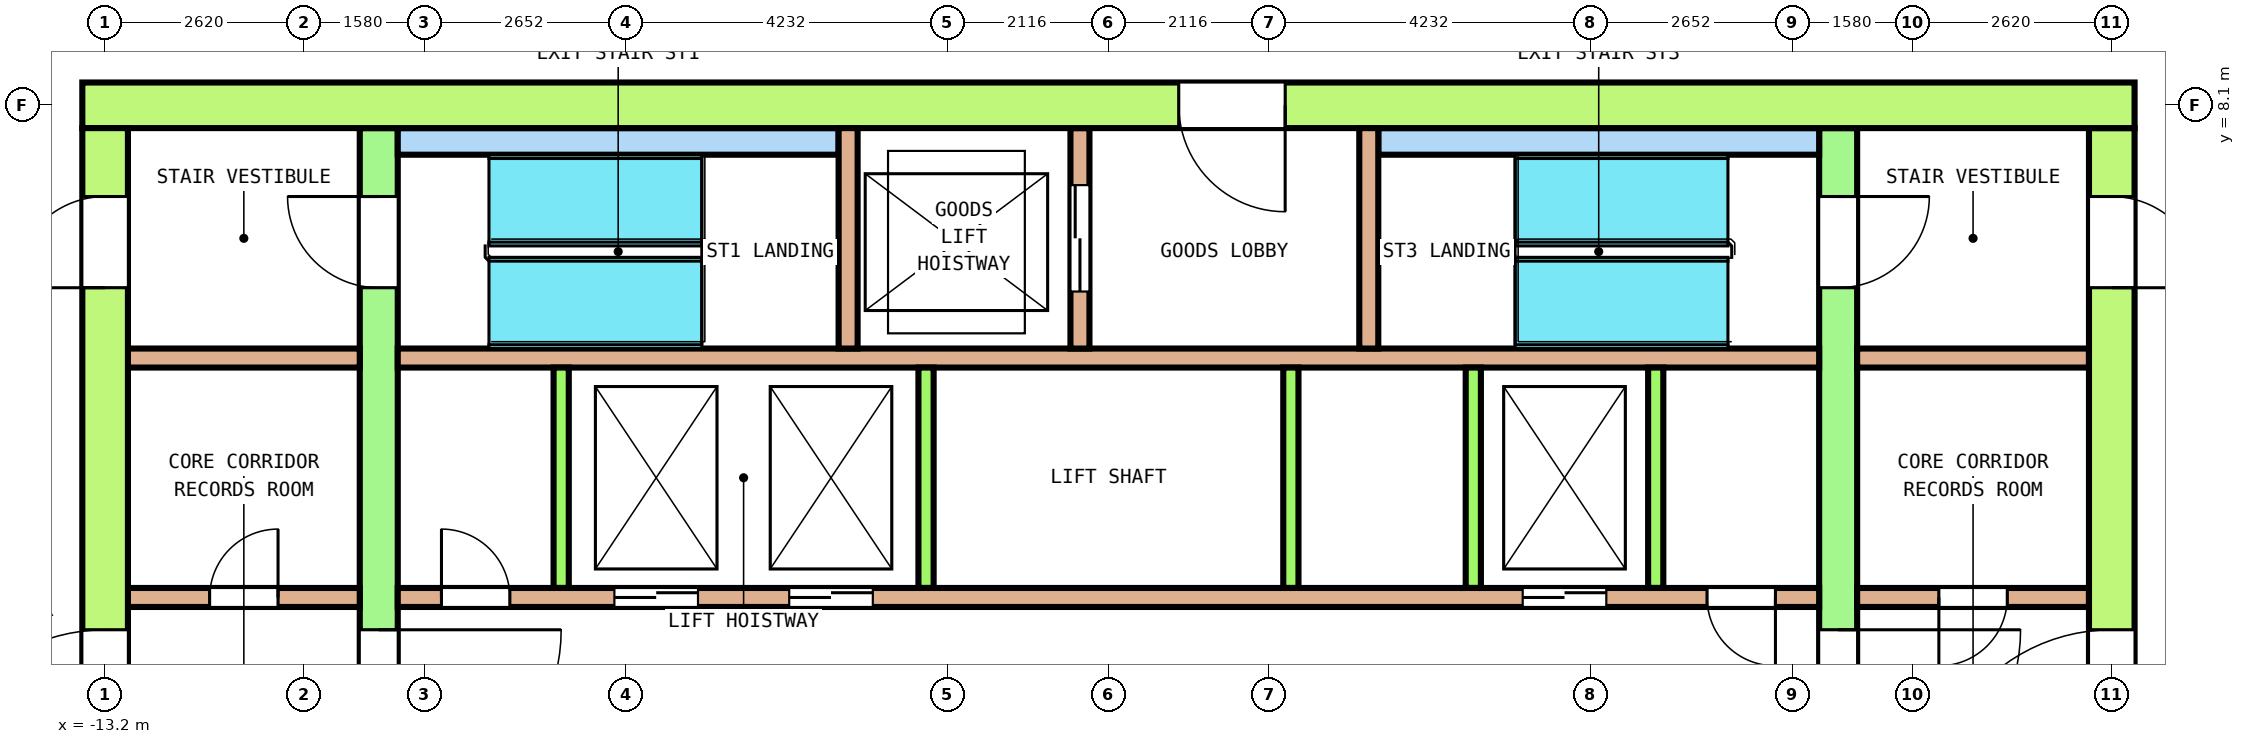
"""IFC4 building model, lengths in metres.
Left out: names, types, materials, properties, quantities, classifications, styles, units other than length and angle.
Written with IfcOpenShell. Run it as: python <this file> out.ifc"""

import sys

from ifc_helpers import new_model, si_unit, direction, frame, frame_2d, origin, place, context, subcontext, project, spatial, rectangle, extrude, element, fill, save


model = new_model("IFC4")
c1 = context("Model", 3, precision=1e-05, world=origin(), true_north=direction((0.0, 1.0)))
c2 = subcontext(c1, "Body", "Model", "MODEL_VIEW")
j1 = project(units=[si_unit("LENGTHUNIT", "METRE"), si_unit("PLANEANGLEUNIT", "RADIAN")], contexts=[c1])
p1 = place(None, origin())
s1 = spatial("IfcSite", under=j1, at=p1, CompositionType="ELEMENT")
p2 = place(p1, origin())
s2 = spatial("IfcBuilding", under=s1, at=p2, CompositionType="ELEMENT")
p3 = place(p2, frame((0.0, 0.0, 211.4)))
s3 = spatial("IfcBuildingStorey", under=s2, at=p3, CompositionType="ELEMENT", Elevation=211.4)
p4 = place(p3, frame((-13.5, 8.1, 0.0), z_axis=(0.0, 0.0, 1.0), x_axis=(1.0, 0.0, 0.0)))
e1 = element("IfcWall", 1, at=p4, inside=s3, PredefinedType="SHEAR", context=c2, shape_type="SweptSolid", body=[
    extrude(rectangle(XDim=27.0, YDim=0.6, at=frame_2d((13.5, 0.0))), origin(), (0.0, 0.0, 1.0), 3.7),
])
p5 = place(p4, frame((14.425, 0.0, 0.0)))
e2 = element("IfcOpeningElement", 2, at=p5, cuts=e1, PredefinedType="OPENING", context=c2, shape_type="SweptSolid", body=[
    extrude(rectangle(XDim=1.4, YDim=2.1, at=frame_2d((0.7, 1.05))), frame((0.0, 0.31, 0.0), z_axis=(0.0, -1.0, 0.0), x_axis=(1.0, 0.0, 0.0)), (0.0, 0.0, 1.0), 0.62),
])
p6 = place(p3, frame((-13.2, -7.8, 0.0), z_axis=(0.0, 0.0, 1.0), x_axis=(0.0, 1.0, 0.0)))
e3 = element("IfcWall", 3, at=p6, inside=s3, PredefinedType="SHEAR", context=c2, shape_type="SweptSolid", body=[
    extrude(rectangle(XDim=15.6, YDim=0.6, at=frame_2d((7.8, 0.0))), origin(), (0.0, 0.0, 1.0), 3.7),
])
p7 = place(p6, frame((6.6, 0.0, 0.0)))
e4 = element("IfcOpeningElement", 4, at=p7, cuts=e3, PredefinedType="OPENING", context=c2, shape_type="SweptSolid", body=[
    extrude(rectangle(XDim=2.4, YDim=2.1, at=frame_2d((1.2, 1.05))), frame((0.0, 0.31, 0.0), z_axis=(0.0, -1.0, 0.0), x_axis=(1.0, 0.0, 0.0)), (0.0, 0.0, 1.0), 0.62),
])
p8 = place(p6, frame((13.5, 0.0, 0.0)))
e5 = element("IfcOpeningElement", 5, at=p8, cuts=e3, PredefinedType="OPENING", context=c2, shape_type="SweptSolid", body=[
    extrude(rectangle(XDim=1.2, YDim=2.1, at=frame_2d((0.6, 1.05))), frame((0.0, 0.31, 0.0), z_axis=(0.0, -1.0, 0.0), x_axis=(1.0, 0.0, 0.0)), (0.0, 0.0, 1.0), 0.62),
])
p9 = place(p6, frame((0.9, 0.0, 0.0)))
e6 = element("IfcOpeningElement", 6, at=p9, cuts=e3, PredefinedType="OPENING", context=c2, shape_type="SweptSolid", body=[
    extrude(rectangle(XDim=1.2, YDim=2.1, at=frame_2d((0.6, 1.05))), frame((0.0, 0.31, 0.0), z_axis=(0.0, -1.0, 0.0), x_axis=(1.0, 0.0, 0.0)), (0.0, 0.0, 1.0), 0.62),
])
p10 = place(p3, frame((13.2, -7.8, 0.0), z_axis=(0.0, 0.0, 1.0), x_axis=(0.0, 1.0, 0.0)))
e7 = element("IfcWall", 7, at=p10, inside=s3, PredefinedType="SHEAR", context=c2, shape_type="SweptSolid", body=[
    extrude(rectangle(XDim=15.6, YDim=0.6, at=frame_2d((7.8, 0.0))), origin(), (0.0, 0.0, 1.0), 3.7),
])
p11 = place(p10, frame((6.6, 0.0, 0.0)))
e8 = element("IfcOpeningElement", 8, at=p11, cuts=e7, PredefinedType="OPENING", context=c2, shape_type="SweptSolid", body=[
    extrude(rectangle(XDim=2.4, YDim=2.1, at=frame_2d((1.2, 1.05))), frame((0.0, 0.31, 0.0), z_axis=(0.0, -1.0, 0.0), x_axis=(1.0, 0.0, 0.0)), (0.0, 0.0, 1.0), 0.62),
])
p12 = place(p10, frame((13.5, 0.0, 0.0)))
e9 = element("IfcOpeningElement", 9, at=p12, cuts=e7, PredefinedType="OPENING", context=c2, shape_type="SweptSolid", body=[
    extrude(rectangle(XDim=1.2, YDim=2.1, at=frame_2d((0.6, 1.05))), frame((0.0, 0.31, 0.0), z_axis=(0.0, -1.0, 0.0), x_axis=(1.0, 0.0, 0.0)), (0.0, 0.0, 1.0), 0.62),
])
p13 = place(p10, frame((1.0, 0.0, 0.0)))
e10 = element("IfcOpeningElement", 10, at=p13, cuts=e7, PredefinedType="OPENING", context=c2, shape_type="SweptSolid", body=[
    extrude(rectangle(XDim=1.0, YDim=2.1, at=frame_2d((0.5, 1.05))), frame((0.0, 0.31, 0.0), z_axis=(0.0, -1.0, 0.0), x_axis=(1.0, 0.0, 0.0)), (0.0, 0.0, 1.0), 0.62),
])
p14 = place(p3, frame((-9.6, -7.8, 0.0), z_axis=(0.0, 0.0, 1.0), x_axis=(0.0, 1.0, 0.0)))
e11 = element("IfcWall", 11, at=p14, inside=s3, PredefinedType="SHEAR", context=c2, shape_type="SweptSolid", body=[
    extrude(rectangle(XDim=15.6, YDim=0.5, at=frame_2d((7.8, 0.0))), origin(), (0.0, 0.0, 1.0), 3.7),
])
p15 = place(p14, frame((6.6, 0.0, 0.0)))
e12 = element("IfcOpeningElement", 12, at=p15, cuts=e11, PredefinedType="OPENING", context=c2, shape_type="SweptSolid", body=[
    extrude(rectangle(XDim=2.4, YDim=2.1, at=frame_2d((1.2, 1.05))), frame((0.0, 0.26, 0.0), z_axis=(0.0, -1.0, 0.0), x_axis=(1.0, 0.0, 0.0)), (0.0, 0.0, 1.0), 0.52),
])
p16 = place(p14, frame((13.5, 0.0, 0.0)))
e13 = element("IfcOpeningElement", 13, at=p16, cuts=e11, PredefinedType="OPENING", context=c2, shape_type="SweptSolid", body=[
    extrude(rectangle(XDim=1.2, YDim=2.1, at=frame_2d((0.6, 1.05))), frame((0.0, 0.26, 0.0), z_axis=(0.0, -1.0, 0.0), x_axis=(1.0, 0.0, 0.0)), (0.0, 0.0, 1.0), 0.52),
])
p17 = place(p14, frame((0.9, 0.0, 0.0)))
e14 = element("IfcOpeningElement", 14, at=p17, cuts=e11, PredefinedType="OPENING", context=c2, shape_type="SweptSolid", body=[
    extrude(rectangle(XDim=1.2, YDim=2.1, at=frame_2d((0.6, 1.05))), frame((0.0, 0.26, 0.0), z_axis=(0.0, -1.0, 0.0), x_axis=(1.0, 0.0, 0.0)), (0.0, 0.0, 1.0), 0.52),
])
p18 = place(p3, frame((9.6, -7.8, 0.0), z_axis=(0.0, 0.0, 1.0), x_axis=(0.0, 1.0, 0.0)))
e15 = element("IfcWall", 15, at=p18, inside=s3, PredefinedType="SHEAR", context=c2, shape_type="SweptSolid", body=[
    extrude(rectangle(XDim=15.6, YDim=0.5, at=frame_2d((7.8, 0.0))), origin(), (0.0, 0.0, 1.0), 3.7),
])
p19 = place(p18, frame((6.6, 0.0, 0.0)))
e16 = element("IfcOpeningElement", 16, at=p19, cuts=e15, PredefinedType="OPENING", context=c2, shape_type="SweptSolid", body=[
    extrude(rectangle(XDim=2.4, YDim=2.1, at=frame_2d((1.2, 1.05))), frame((0.0, 0.26, 0.0), z_axis=(0.0, -1.0, 0.0), x_axis=(1.0, 0.0, 0.0)), (0.0, 0.0, 1.0), 0.52),
])
p20 = place(p18, frame((13.5, 0.0, 0.0)))
e17 = element("IfcOpeningElement", 17, at=p20, cuts=e15, PredefinedType="OPENING", context=c2, shape_type="SweptSolid", body=[
    extrude(rectangle(XDim=1.2, YDim=2.1, at=frame_2d((0.6, 1.05))), frame((0.0, 0.26, 0.0), z_axis=(0.0, -1.0, 0.0), x_axis=(1.0, 0.0, 0.0)), (0.0, 0.0, 1.0), 0.52),
])
p21 = place(p18, frame((1.0, 0.0, 0.0)))
e18 = element("IfcOpeningElement", 18, at=p21, cuts=e15, PredefinedType="OPENING", context=c2, shape_type="SweptSolid", body=[
    extrude(rectangle(XDim=1.0, YDim=2.1, at=frame_2d((0.5, 1.05))), frame((0.0, 0.26, 0.0), z_axis=(0.0, -1.0, 0.0), x_axis=(1.0, 0.0, 0.0)), (0.0, 0.0, 1.0), 0.52),
])
p22 = place(p3, frame((-12.9, 1.625, 0.0), z_axis=(0.0, 0.0, 1.0), x_axis=(1.0, 0.0, 0.0)))
e19 = element("IfcWall", 19, at=p22, inside=s3, PredefinedType="SOLIDWALL", context=c2, shape_type="SweptSolid", body=[
    extrude(rectangle(XDim=3.05, YDim=0.25, at=frame_2d((1.525, 0.0))), origin(), (0.0, 0.0, 1.0), 3.7),
])
p23 = place(p22, frame((1.075, 0.0, 0.0)))
e20 = element("IfcOpeningElement", 20, at=p23, cuts=e19, PredefinedType="OPENING", context=c2, shape_type="SweptSolid", body=[
    extrude(rectangle(XDim=0.9, YDim=2.1, at=frame_2d((0.45, 1.05))), frame((0.0, 0.135, 0.0), z_axis=(0.0, -1.0, 0.0), x_axis=(1.0, 0.0, 0.0)), (0.0, 0.0, 1.0), 0.27),
])
p24 = place(p3, frame((-9.35, 1.625, 0.0), z_axis=(0.0, 0.0, 1.0), x_axis=(1.0, 0.0, 0.0)))
e21 = element("IfcWall", 21, at=p24, inside=s3, PredefinedType="SOLIDWALL", context=c2, shape_type="SweptSolid", body=[
    extrude(rectangle(XDim=18.7, YDim=0.25, at=frame_2d((9.35, 0.0))), origin(), (0.0, 0.0, 1.0), 3.7),
])
p25 = place(p24, frame((2.85, 0.0, 0.0)))
e22 = element("IfcOpeningElement", 22, at=p25, cuts=e21, PredefinedType="OPENING", context=c2, shape_type="SweptSolid", body=[
    extrude(rectangle(XDim=1.1, YDim=2.1, at=frame_2d((0.55, 1.05))), frame((0.0, 0.135, 0.0), z_axis=(0.0, -1.0, 0.0), x_axis=(1.0, 0.0, 0.0)), (0.0, 0.0, 1.0), 0.27),
])
p26 = place(p24, frame((5.15, 0.0, 0.0)))
e23 = element("IfcOpeningElement", 23, at=p26, cuts=e21, PredefinedType="OPENING", context=c2, shape_type="SweptSolid", body=[
    extrude(rectangle(XDim=1.1, YDim=2.1, at=frame_2d((0.55, 1.05))), frame((0.0, 0.135, 0.0), z_axis=(0.0, -1.0, 0.0), x_axis=(1.0, 0.0, 0.0)), (0.0, 0.0, 1.0), 0.27),
])
p27 = place(p24, frame((14.8, 0.0, 0.0)))
e24 = element("IfcOpeningElement", 24, at=p27, cuts=e21, PredefinedType="OPENING", context=c2, shape_type="SweptSolid", body=[
    extrude(rectangle(XDim=1.1, YDim=2.1, at=frame_2d((0.55, 1.05))), frame((0.0, 0.135, 0.0), z_axis=(0.0, -1.0, 0.0), x_axis=(1.0, 0.0, 0.0)), (0.0, 0.0, 1.0), 0.27),
])
p28 = place(p24, frame((0.575, 0.0, 0.0)))
e25 = element("IfcOpeningElement", 25, at=p28, cuts=e21, PredefinedType="OPENING", context=c2, shape_type="SweptSolid", body=[
    extrude(rectangle(XDim=0.9, YDim=2.1, at=frame_2d((0.45, 1.05))), frame((0.0, 0.135, 0.0), z_axis=(0.0, -1.0, 0.0), x_axis=(1.0, 0.0, 0.0)), (0.0, 0.0, 1.0), 0.27),
])
p29 = place(p24, frame((17.225, 0.0, 0.0)))
e26 = element("IfcOpeningElement", 26, at=p29, cuts=e21, PredefinedType="OPENING", context=c2, shape_type="SweptSolid", body=[
    extrude(rectangle(XDim=0.9, YDim=2.1, at=frame_2d((0.45, 1.05))), frame((0.0, 0.135, 0.0), z_axis=(0.0, -1.0, 0.0), x_axis=(1.0, 0.0, 0.0)), (0.0, 0.0, 1.0), 0.27),
])
p30 = place(p3, frame((9.85, 1.625, 0.0), z_axis=(0.0, 0.0, 1.0), x_axis=(1.0, 0.0, 0.0)))
e27 = element("IfcWall", 27, at=p30, inside=s3, PredefinedType="SOLIDWALL", context=c2, shape_type="SweptSolid", body=[
    extrude(rectangle(XDim=3.05, YDim=0.25, at=frame_2d((1.525, 0.0))), origin(), (0.0, 0.0, 1.0), 3.7),
])
p31 = place(p30, frame((1.075, 0.0, 0.0)))
e28 = element("IfcOpeningElement", 28, at=p31, cuts=e27, PredefinedType="OPENING", context=c2, shape_type="SweptSolid", body=[
    extrude(rectangle(XDim=0.9, YDim=2.1, at=frame_2d((0.45, 1.05))), frame((0.0, 0.135, 0.0), z_axis=(0.0, -1.0, 0.0), x_axis=(1.0, 0.0, 0.0)), (0.0, 0.0, 1.0), 0.27),
])
p32 = place(p3, frame((-12.9, 4.775, 0.0), z_axis=(0.0, 0.0, 1.0), x_axis=(1.0, 0.0, 0.0)))
e29 = element("IfcWall", 29, at=p32, inside=s3, PredefinedType="SOLIDWALL", context=c2, shape_type="SweptSolid", body=[
    extrude(rectangle(XDim=3.05, YDim=0.25, at=frame_2d((1.525, 0.0))), origin(), (0.0, 0.0, 1.0), 3.7),
])
p33 = place(p3, frame((-9.35, 4.775, 0.0), z_axis=(0.0, 0.0, 1.0), x_axis=(1.0, 0.0, 0.0)))
e30 = element("IfcWall", 30, at=p33, inside=s3, PredefinedType="SOLIDWALL", context=c2, shape_type="SweptSolid", body=[
    extrude(rectangle(XDim=18.7, YDim=0.25, at=frame_2d((9.35, 0.0))), origin(), (0.0, 0.0, 1.0), 3.7),
])
p34 = place(p3, frame((9.85, 4.775, 0.0), z_axis=(0.0, 0.0, 1.0), x_axis=(1.0, 0.0, 0.0)))
e31 = element("IfcWall", 31, at=p34, inside=s3, PredefinedType="SOLIDWALL", context=c2, shape_type="SweptSolid", body=[
    extrude(rectangle(XDim=3.05, YDim=0.25, at=frame_2d((1.525, 0.0))), origin(), (0.0, 0.0, 1.0), 3.7),
])
for number, where, z_axis, x_axis in (
    (32, (-7.2, 1.75, 0.0), (0.0, 0.0, 1.0), (0.0, 1.0, 0.0)),
    (33, (-2.4, 1.75, 0.0), (0.0, 0.0, 1.0), (0.0, 1.0, 0.0)),
    (34, (2.4, 1.75, 0.0), (0.0, 0.0, 1.0), (0.0, 1.0, 0.0)),
    (35, (4.8, 1.75, 0.0), (0.0, 0.0, 1.0), (0.0, 1.0, 0.0)),
    (36, (7.2, 1.75, 0.0), (0.0, 0.0, 1.0), (0.0, 1.0, 0.0)),
):
    element("IfcWall", number, at=place(p3, frame(where, z_axis=z_axis, x_axis=x_axis)), inside=s3, PredefinedType="SOLIDWALL", context=c2, shape_type="SweptSolid", body=[
        extrude(rectangle(XDim=2.9, YDim=0.2, at=frame_2d((1.45, 0.0))), origin(), (0.0, 0.0, 1.0), 3.7),
    ])
for number, where, z_axis, x_axis in (
    (37, (-9.35, 7.625, 0.0), (0.0, 0.0, 1.0), (1.0, 0.0, 0.0)),
    (38, (3.55, 7.625, 0.0), (0.0, 0.0, 1.0), (1.0, 0.0, 0.0)),
):
    element("IfcWall", number, at=place(p3, frame(where, z_axis=z_axis, x_axis=x_axis)), inside=s3, PredefinedType="SOLIDWALL", context=c2, shape_type="SweptSolid", body=[
        extrude(rectangle(XDim=5.8, YDim=0.35, at=frame_2d((2.9, 0.0))), origin(), (0.0, 0.0, 1.0), 3.7),
    ])
p35 = place(p3, frame((-3.425, 4.9, 0.0), z_axis=(0.0, 0.0, 1.0), x_axis=(0.0, 1.0, 0.0)))
e39 = element("IfcWall", 39, at=p35, inside=s3, PredefinedType="SOLIDWALL", context=c2, shape_type="SweptSolid", body=[
    extrude(rectangle(XDim=2.9, YDim=0.25, at=frame_2d((1.45, 0.0))), origin(), (0.0, 0.0, 1.0), 3.7),
])
p36 = place(p3, frame((-0.375, 4.9, 0.0), z_axis=(0.0, 0.0, 1.0), x_axis=(0.0, 1.0, 0.0)))
e40 = element("IfcWall", 40, at=p36, inside=s3, PredefinedType="SOLIDWALL", context=c2, shape_type="SweptSolid", body=[
    extrude(rectangle(XDim=2.9, YDim=0.25, at=frame_2d((1.45, 0.0))), origin(), (0.0, 0.0, 1.0), 3.7),
])
p37 = place(p36, frame((0.75, 0.0, 0.0)))
e41 = element("IfcOpeningElement", 41, at=p37, cuts=e40, PredefinedType="OPENING", context=c2, shape_type="SweptSolid", body=[
    extrude(rectangle(XDim=1.4, YDim=2.1, at=frame_2d((0.7, 1.05))), frame((0.0, 0.135, 0.0), z_axis=(0.0, -1.0, 0.0), x_axis=(1.0, 0.0, 0.0)), (0.0, 0.0, 1.0), 0.27),
])
p38 = place(p3, frame((3.425, 4.9, 0.0), z_axis=(0.0, 0.0, 1.0), x_axis=(0.0, 1.0, 0.0)))
e42 = element("IfcWall", 42, at=p38, inside=s3, PredefinedType="SOLIDWALL", context=c2, shape_type="SweptSolid", body=[
    extrude(rectangle(XDim=2.9, YDim=0.25, at=frame_2d((1.45, 0.0))), origin(), (0.0, 0.0, 1.0), 3.7),
])
p39 = place(p25, origin())
e43 = element("IfcDoor", 43, at=p39, inside=s3, OperationType="DOUBLE_DOOR_SLIDING", PredefinedType="DOOR", context=c2, shape_type="SweptSolid", body=[
    extrude(rectangle(XDim=1.1, YDim=2.1, at=frame_2d((0.55, 1.05))), frame((0.0, 0.075, 0.0), z_axis=(0.0, -1.0, 0.0), x_axis=(1.0, 0.0, 0.0)), (0.0, 0.0, 1.0), 0.15),
])
fill(e22, e43)
p40 = place(p26, origin())
e44 = element("IfcDoor", 44, at=p40, inside=s3, OperationType="DOUBLE_DOOR_SLIDING", PredefinedType="DOOR", context=c2, shape_type="SweptSolid", body=[
    extrude(rectangle(XDim=1.1, YDim=2.1, at=frame_2d((0.55, 1.05))), frame((0.0, 0.075, 0.0), z_axis=(0.0, -1.0, 0.0), x_axis=(1.0, 0.0, 0.0)), (0.0, 0.0, 1.0), 0.15),
])
fill(e23, e44)
p41 = place(p27, origin())
e45 = element("IfcDoor", 45, at=p41, inside=s3, OperationType="DOUBLE_DOOR_SLIDING", PredefinedType="DOOR", context=c2, shape_type="SweptSolid", body=[
    extrude(rectangle(XDim=1.1, YDim=2.1, at=frame_2d((0.55, 1.05))), frame((0.0, 0.075, 0.0), z_axis=(0.0, -1.0, 0.0), x_axis=(1.0, 0.0, 0.0)), (0.0, 0.0, 1.0), 0.15),
])
fill(e24, e45)
p42 = place(p37, origin())
e46 = element("IfcDoor", 46, at=p42, inside=s3, OperationType="DOUBLE_DOOR_SLIDING", PredefinedType="DOOR", context=c2, shape_type="SweptSolid", body=[
    extrude(rectangle(XDim=1.4, YDim=2.1, at=frame_2d((0.7, 1.05))), frame((0.0, 0.075, 0.0), z_axis=(0.0, -1.0, 0.0), x_axis=(1.0, 0.0, 0.0)), (0.0, 0.0, 1.0), 0.15),
])
fill(e41, e46)
p43 = place(p15, origin())
e47 = element("IfcDoor", 47, at=p43, inside=s3, OperationType="DOUBLE_DOOR_SINGLE_SWING", PredefinedType="DOOR", context=c2, shape_type="SweptSolid", body=[
    extrude(rectangle(XDim=2.4, YDim=2.1, at=frame_2d((1.2, 1.05))), frame((0.0, 0.2, 0.0), z_axis=(0.0, -1.0, 0.0), x_axis=(1.0, 0.0, 0.0)), (0.0, 0.0, 1.0), 0.4),
])
fill(e12, e47)
p44 = place(p19, origin())
e48 = element("IfcDoor", 48, at=p44, inside=s3, OperationType="DOUBLE_DOOR_SINGLE_SWING", PredefinedType="DOOR", context=c2, shape_type="SweptSolid", body=[
    extrude(rectangle(XDim=2.4, YDim=2.1, at=frame_2d((1.2, 1.05))), frame((0.0, 0.2, 0.0), z_axis=(0.0, -1.0, 0.0), x_axis=(1.0, 0.0, 0.0)), (0.0, 0.0, 1.0), 0.4),
])
fill(e16, e48)
p45 = place(p7, origin())
e49 = element("IfcDoor", 49, at=p45, inside=s3, OperationType="DOUBLE_DOOR_SINGLE_SWING", PredefinedType="DOOR", context=c2, shape_type="SweptSolid", body=[
    extrude(rectangle(XDim=2.4, YDim=2.1, at=frame_2d((1.2, 1.05))), frame((0.0, 0.25, 0.0), z_axis=(0.0, -1.0, 0.0), x_axis=(1.0, 0.0, 0.0)), (0.0, 0.0, 1.0), 0.5),
])
fill(e4, e49)
p46 = place(p11, origin())
e50 = element("IfcDoor", 50, at=p46, inside=s3, OperationType="DOUBLE_DOOR_SINGLE_SWING", PredefinedType="DOOR", context=c2, shape_type="SweptSolid", body=[
    extrude(rectangle(XDim=2.4, YDim=2.1, at=frame_2d((1.2, 1.05))), frame((0.0, 0.25, 0.0), z_axis=(0.0, -1.0, 0.0), x_axis=(1.0, 0.0, 0.0)), (0.0, 0.0, 1.0), 0.5),
])
fill(e8, e50)
p47 = place(p16, origin())
e51 = element("IfcDoor", 51, at=p47, inside=s3, OperationType="SINGLE_SWING_RIGHT", PredefinedType="DOOR", context=c2, shape_type="SweptSolid", body=[
    extrude(rectangle(XDim=1.2, YDim=2.1, at=frame_2d((0.6, 1.05))), frame((0.0, 0.2, 0.0), z_axis=(0.0, -1.0, 0.0), x_axis=(1.0, 0.0, 0.0)), (0.0, 0.0, 1.0), 0.4),
])
fill(e13, e51)
p48 = place(p8, origin())
e52 = element("IfcDoor", 52, at=p48, inside=s3, OperationType="SINGLE_SWING_LEFT", PredefinedType="DOOR", context=c2, shape_type="SweptSolid", body=[
    extrude(rectangle(XDim=1.2, YDim=2.1, at=frame_2d((0.6, 1.05))), frame((0.0, 0.25, 0.0), z_axis=(0.0, -1.0, 0.0), x_axis=(1.0, 0.0, 0.0)), (0.0, 0.0, 1.0), 0.5),
])
fill(e5, e52)
p49 = place(p20, origin())
e53 = element("IfcDoor", 53, at=p49, inside=s3, OperationType="SINGLE_SWING_RIGHT", PredefinedType="DOOR", context=c2, shape_type="SweptSolid", body=[
    extrude(rectangle(XDim=1.2, YDim=2.1, at=frame_2d((0.6, 1.05))), frame((0.0, 0.2, 0.0), z_axis=(0.0, -1.0, 0.0), x_axis=(1.0, 0.0, 0.0)), (0.0, 0.0, 1.0), 0.4),
])
fill(e17, e53)
p50 = place(p12, origin())
e54 = element("IfcDoor", 54, at=p50, inside=s3, OperationType="SINGLE_SWING_LEFT", PredefinedType="DOOR", context=c2, shape_type="SweptSolid", body=[
    extrude(rectangle(XDim=1.2, YDim=2.1, at=frame_2d((0.6, 1.05))), frame((0.0, 0.25, 0.0), z_axis=(0.0, -1.0, 0.0), x_axis=(1.0, 0.0, 0.0)), (0.0, 0.0, 1.0), 0.5),
])
fill(e9, e54)
p51 = place(p5, origin())
e55 = element("IfcDoor", 55, at=p51, inside=s3, OperationType="DOUBLE_DOOR_SINGLE_SWING", PredefinedType="DOOR", context=c2, shape_type="SweptSolid", body=[
    extrude(rectangle(XDim=1.4, YDim=2.1, at=frame_2d((0.7, 1.05))), frame((0.0, 0.25, 0.0), z_axis=(0.0, -1.0, 0.0), x_axis=(1.0, 0.0, 0.0)), (0.0, 0.0, 1.0), 0.5),
])
fill(e2, e55)
p52 = place(p23, origin())
e56 = element("IfcDoor", 56, at=p52, inside=s3, OperationType="SINGLE_SWING_RIGHT", PredefinedType="DOOR", context=c2, shape_type="SweptSolid", body=[
    extrude(rectangle(XDim=0.9, YDim=2.1, at=frame_2d((0.45, 1.05))), frame((0.0, 0.075, 0.0), z_axis=(0.0, -1.0, 0.0), x_axis=(1.0, 0.0, 0.0)), (0.0, 0.0, 1.0), 0.15),
])
fill(e20, e56)
p53 = place(p28, origin())
e57 = element("IfcDoor", 57, at=p53, inside=s3, OperationType="SINGLE_SWING_LEFT", PredefinedType="DOOR", context=c2, shape_type="SweptSolid", body=[
    extrude(rectangle(XDim=0.9, YDim=2.1, at=frame_2d((0.45, 1.05))), frame((0.0, 0.075, 0.0), z_axis=(0.0, -1.0, 0.0), x_axis=(1.0, 0.0, 0.0)), (0.0, 0.0, 1.0), 0.15),
])
fill(e25, e57)
p54 = place(p29, origin())
e58 = element("IfcDoor", 58, at=p54, inside=s3, OperationType="SINGLE_SWING_RIGHT", PredefinedType="DOOR", context=c2, shape_type="SweptSolid", body=[
    extrude(rectangle(XDim=0.9, YDim=2.1, at=frame_2d((0.45, 1.05))), frame((0.0, 0.075, 0.0), z_axis=(0.0, -1.0, 0.0), x_axis=(1.0, 0.0, 0.0)), (0.0, 0.0, 1.0), 0.15),
])
fill(e26, e58)
p55 = place(p31, origin())
e59 = element("IfcDoor", 59, at=p55, inside=s3, OperationType="SINGLE_SWING_LEFT", PredefinedType="DOOR", context=c2, shape_type="SweptSolid", body=[
    extrude(rectangle(XDim=0.9, YDim=2.1, at=frame_2d((0.45, 1.05))), frame((0.0, 0.075, 0.0), z_axis=(0.0, -1.0, 0.0), x_axis=(1.0, 0.0, 0.0)), (0.0, 0.0, 1.0), 0.15),
])
fill(e28, e59)
save(model, sys.argv[1])
